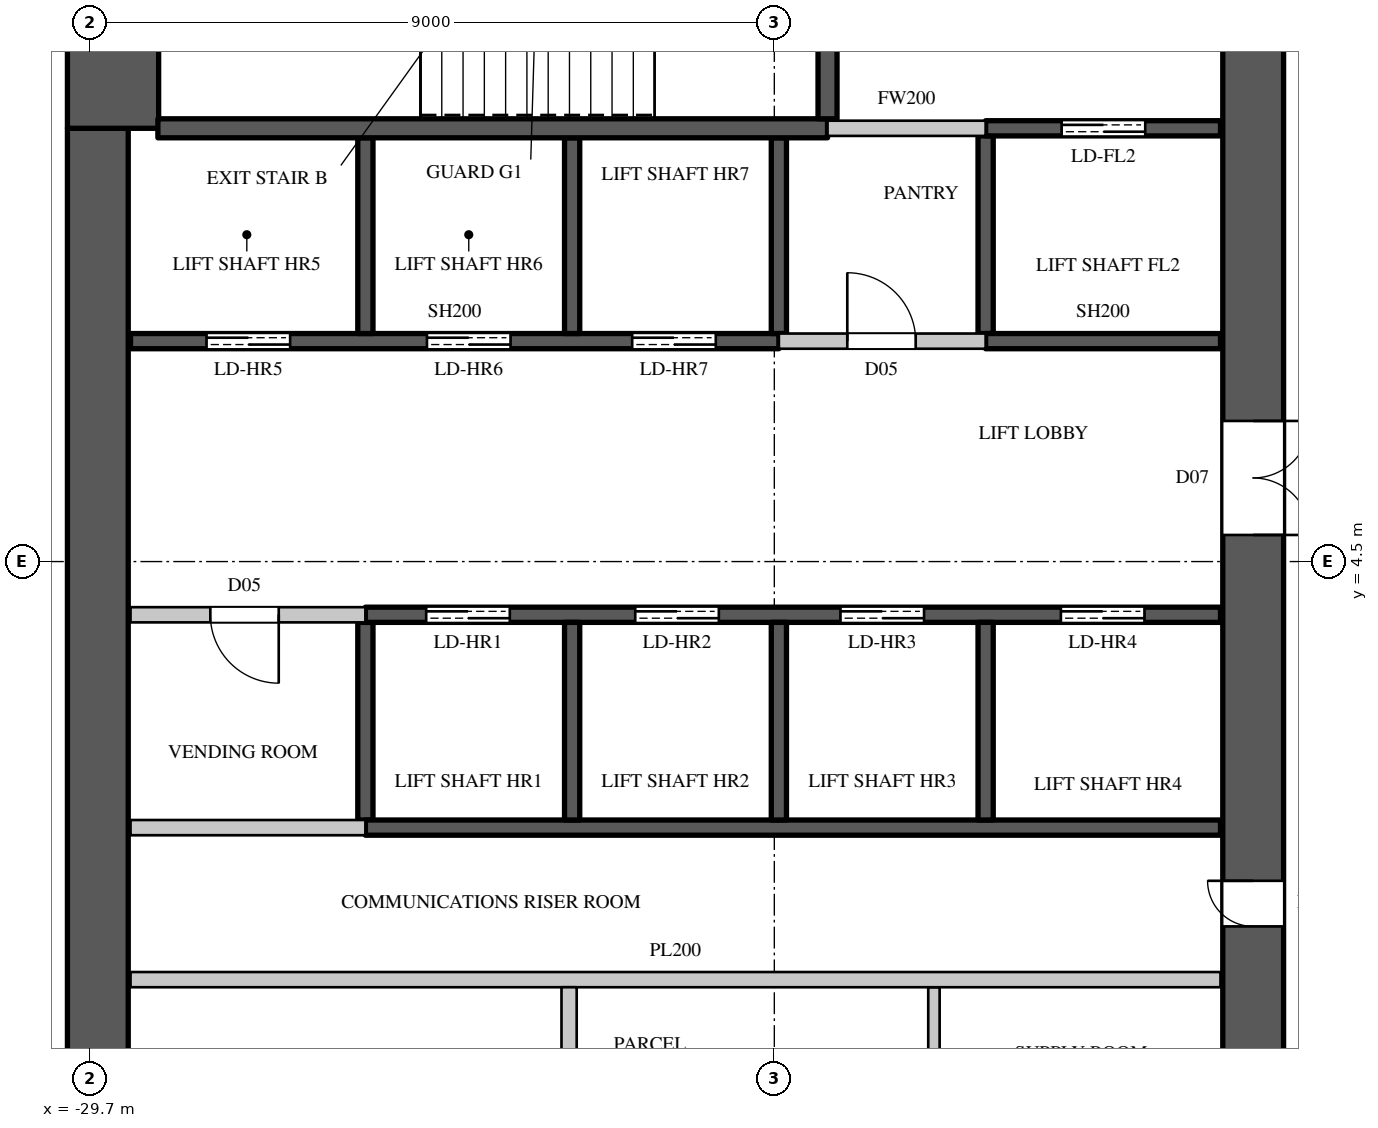
"""IFC4 building model, lengths in metres.
Left out: names, types, materials, properties, quantities, classifications, styles, units other than length and angle.
Written with IfcOpenShell. Run it as: python <this file> out.ifc"""

import sys

from ifc_helpers import new_model, si_unit, direction, frame, frame_2d, origin, place, context, subcontext, project, spatial, rectangle, extrude, element, fill, save


model = new_model("IFC4")
c1 = context("Model", 3, precision=1e-05, world=origin(), true_north=direction((0.0, 1.0)))
c2 = subcontext(c1, "Body", "Model", "MODEL_VIEW")
j1 = project(units=[si_unit("LENGTHUNIT", "METRE"), si_unit("PLANEANGLEUNIT", "RADIAN")], contexts=[c1])
p1 = place(None, origin())
s1 = spatial("IfcSite", under=j1, at=p1, CompositionType="ELEMENT")
p2 = place(p1, origin())
s2 = spatial("IfcBuilding", under=s1, at=p2, CompositionType="ELEMENT")
p3 = place(p2, frame((0.0, 0.0, 201.5)))
s3 = spatial("IfcBuildingStorey", under=s2, at=p3, CompositionType="ELEMENT", Elevation=201.5)
p4 = place(p3, frame((-14.4, -14.8, 0.0), z_axis=(0.0, 0.0, 1.0), x_axis=(0.0, 1.0, 0.0)))
e1 = element("IfcWall", 1, at=p4, inside=s3, PredefinedType="SHEAR", context=c2, shape_type="SweptSolid", body=[
    extrude(rectangle(XDim=29.6, YDim=0.8, at=frame_2d((14.8, 0.0))), origin(), (0.0, 0.0, 1.0), 4.1),
])
p5 = place(p4, frame((1.55, 0.0, 0.0)))
e2 = element("IfcOpeningElement", 2, at=p5, cuts=e1, PredefinedType="OPENING", context=c2, shape_type="SweptSolid", body=[
    extrude(rectangle(XDim=1.5, YDim=2.4, at=frame_2d((0.75, 1.2))), frame((0.0, 0.41, 0.0), z_axis=(0.0, -1.0, 0.0), x_axis=(1.0, 0.0, 0.0)), (0.0, 0.0, 1.0), 0.82),
])
p6 = place(p4, frame((26.55, 0.0, 0.0)))
e3 = element("IfcOpeningElement", 3, at=p6, cuts=e1, PredefinedType="OPENING", context=c2, shape_type="SweptSolid", body=[
    extrude(rectangle(XDim=1.5, YDim=2.4, at=frame_2d((0.75, 1.2))), frame((0.0, 0.41, 0.0), z_axis=(0.0, -1.0, 0.0), x_axis=(1.0, 0.0, 0.0)), (0.0, 0.0, 1.0), 0.82),
])
p7 = place(p4, frame((8.45, 0.0, 0.0)))
e4 = element("IfcOpeningElement", 4, at=p7, cuts=e1, PredefinedType="OPENING", context=c2, shape_type="SweptSolid", body=[
    extrude(rectangle(XDim=1.5, YDim=2.4, at=frame_2d((0.75, 1.2))), frame((0.0, 0.41, 0.0), z_axis=(0.0, -1.0, 0.0), x_axis=(1.0, 0.0, 0.0)), (0.0, 0.0, 1.0), 0.82),
])
p8 = place(p4, frame((19.65, 0.0, 0.0)))
e5 = element("IfcOpeningElement", 5, at=p8, cuts=e1, PredefinedType="OPENING", context=c2, shape_type="SweptSolid", body=[
    extrude(rectangle(XDim=1.5, YDim=2.4, at=frame_2d((0.75, 1.2))), frame((0.0, 0.41, 0.0), z_axis=(0.0, -1.0, 0.0), x_axis=(1.0, 0.0, 0.0)), (0.0, 0.0, 1.0), 0.82),
])
p9 = place(p4, frame((14.5, 0.0, 0.0)))
e6 = element("IfcOpeningElement", 6, at=p9, cuts=e1, PredefinedType="OPENING", context=c2, shape_type="SweptSolid", body=[
    extrude(rectangle(XDim=0.6, YDim=2.0, at=frame_2d((0.3, 1.0))), frame((0.0, 0.41, 0.0), z_axis=(0.0, -1.0, 0.0), x_axis=(1.0, 0.0, 0.0)), (0.0, 0.0, 1.0), 0.82),
])
p10 = place(p3, frame((-29.6, -10.2, 0.0), z_axis=(0.0, 0.0, 1.0), x_axis=(0.0, 1.0, 0.0)))
e7 = element("IfcWall", 7, at=p10, inside=s3, PredefinedType="SHEAR", context=c2, shape_type="SweptSolid", body=[
    extrude(rectangle(XDim=20.4, YDim=0.8, at=frame_2d((10.2, 0.0))), origin(), (0.0, 0.0, 1.0), 4.1),
])
p11 = place(p3, frame((-29.4, 10.2, 0.0), z_axis=(0.0, 0.0, 1.0), x_axis=(0.0, 1.0, 0.0)))
e8 = element("IfcWall", 8, at=p11, inside=s3, PredefinedType="SHEAR", context=c2, shape_type="SweptSolid", body=[
    extrude(rectangle(XDim=4.6, YDim=1.2, at=frame_2d((2.3, 0.0))), origin(), (0.0, 0.0, 1.0), 4.1),
])
p12 = place(p3, frame((-29.17, 3.8, 0.0), z_axis=(0.0, 0.0, 1.0), x_axis=(1.0, 0.0, 0.0)))
e9 = element("IfcWall", 9, at=p12, inside=s3, PredefinedType="PARTITIONING", context=c2, shape_type="SweptSolid", body=[
    extrude(rectangle(XDim=3.09, YDim=0.2, at=frame_2d((1.545, 0.0))), origin(), (0.0, 0.0, 1.0), 3.8),
])
p13 = place(p12, frame((1.05, 0.0, 0.0)))
e10 = element("IfcOpeningElement", 10, at=p13, cuts=e9, PredefinedType="OPENING", context=c2, shape_type="SweptSolid", body=[
    extrude(rectangle(XDim=0.9, YDim=2.2, at=frame_2d((0.45, 1.1))), frame((0.0, 0.11, 0.0), z_axis=(0.0, -1.0, 0.0), x_axis=(1.0, 0.0, 0.0)), (0.0, 0.0, 1.0), 0.22),
])
p14 = place(p3, frame((-20.64, 7.4, 0.0), z_axis=(0.0, 0.0, 1.0), x_axis=(1.0, 0.0, 0.0)))
e11 = element("IfcWall", 11, at=p14, inside=s3, PredefinedType="PARTITIONING", context=c2, shape_type="SweptSolid", body=[
    extrude(rectangle(XDim=2.72, YDim=0.2, at=frame_2d((1.36, 0.0))), origin(), (0.0, 0.0, 1.0), 3.8),
])
p15 = place(p14, frame((0.9, 0.0, 0.0)))
e12 = element("IfcOpeningElement", 12, at=p15, cuts=e11, PredefinedType="OPENING", context=c2, shape_type="SweptSolid", body=[
    extrude(rectangle(XDim=0.9, YDim=2.2, at=frame_2d((0.45, 1.1))), frame((0.0, 0.11, 0.0), z_axis=(0.0, -1.0, 0.0), x_axis=(1.0, 0.0, 0.0)), (0.0, 0.0, 1.0), 0.22),
])
p16 = place(p3, frame((-20.0, 10.2, 0.0), z_axis=(0.0, 0.0, 1.0), x_axis=(1.0, 0.0, 0.0)))
e13 = element("IfcWall", 13, at=p16, inside=s3, PredefinedType="PARTITIONING", context=c2, shape_type="SweptSolid", body=[
    extrude(rectangle(XDim=2.08, YDim=0.2, at=frame_2d((1.04, 0.0))), origin(), (0.0, 0.0, 1.0), 3.8),
])
p17 = place(p3, frame((-18.6, -3.7, 0.0), z_axis=(0.0, 0.0, 1.0), x_axis=(0.0, 1.0, 0.0)))
e14 = element("IfcWall", 14, at=p17, inside=s3, PredefinedType="PARTITIONING", context=c2, shape_type="SweptSolid", body=[
    extrude(rectangle(XDim=2.6, YDim=0.15, at=frame_2d((1.3, 0.0))), origin(), (0.0, 0.0, 1.0), 3.8),
])
p18 = place(p3, frame((-29.17, -1.0, 0.0), z_axis=(0.0, 0.0, 1.0), x_axis=(1.0, 0.0, 0.0)))
e15 = element("IfcWall", 15, at=p18, inside=s3, PredefinedType="PARTITIONING", context=c2, shape_type="SweptSolid", body=[
    extrude(rectangle(XDim=14.34, YDim=0.2, at=frame_2d((7.17, 0.0))), origin(), (0.0, 0.0, 1.0), 3.8),
])
p19 = place(p3, frame((-29.17, 1.0, 0.0), z_axis=(0.0, 0.0, 1.0), x_axis=(1.0, 0.0, 0.0)))
e16 = element("IfcWall", 16, at=p19, inside=s3, PredefinedType="PARTITIONING", context=c2, shape_type="SweptSolid", body=[
    extrude(rectangle(XDim=3.09, YDim=0.2, at=frame_2d((1.545, 0.0))), origin(), (0.0, 0.0, 1.0), 3.8),
])
p20 = place(p3, frame((-23.4, -3.7, 0.0), z_axis=(0.0, 0.0, 1.0), x_axis=(0.0, 1.0, 0.0)))
e17 = element("IfcWall", 17, at=p20, inside=s3, PredefinedType="PARTITIONING", context=c2, shape_type="SweptSolid", body=[
    extrude(rectangle(XDim=2.6, YDim=0.2, at=frame_2d((1.3, 0.0))), origin(), (0.0, 0.0, 1.0), 3.8),
])
p21 = place(p3, frame((-29.17, 7.4, 0.0), z_axis=(0.0, 0.0, 1.0), x_axis=(1.0, 0.0, 0.0)))
e18 = element("IfcWall", 18, at=p21, inside=s3, PredefinedType="SHEAR", context=c2, shape_type="SweptSolid", body=[
    extrude(rectangle(XDim=8.53, YDim=0.2, at=frame_2d((4.265, 0.0))), origin(), (0.0, 0.0, 1.0), 3.8),
])
p22 = place(p21, frame((1.0, 0.0, 0.0)))
e19 = element("IfcOpeningElement", 19, at=p22, cuts=e18, PredefinedType="OPENING", context=c2, shape_type="SweptSolid", body=[
    extrude(rectangle(XDim=1.1, YDim=2.2, at=frame_2d((0.55, 1.1))), frame((0.0, 0.11, 0.0), z_axis=(0.0, -1.0, 0.0), x_axis=(1.0, 0.0, 0.0)), (0.0, 0.0, 1.0), 0.22),
])
p23 = place(p21, frame((3.9, 0.0, 0.0)))
e20 = element("IfcOpeningElement", 20, at=p23, cuts=e18, PredefinedType="OPENING", context=c2, shape_type="SweptSolid", body=[
    extrude(rectangle(XDim=1.1, YDim=2.2, at=frame_2d((0.55, 1.1))), frame((0.0, 0.11, 0.0), z_axis=(0.0, -1.0, 0.0), x_axis=(1.0, 0.0, 0.0)), (0.0, 0.0, 1.0), 0.22),
])
p24 = place(p21, frame((6.6, 0.0, 0.0)))
e21 = element("IfcOpeningElement", 21, at=p24, cuts=e18, PredefinedType="OPENING", context=c2, shape_type="SweptSolid", body=[
    extrude(rectangle(XDim=1.1, YDim=2.2, at=frame_2d((0.55, 1.1))), frame((0.0, 0.11, 0.0), z_axis=(0.0, -1.0, 0.0), x_axis=(1.0, 0.0, 0.0)), (0.0, 0.0, 1.0), 0.22),
])
p25 = place(p3, frame((-26.08, 1.1, 0.0), z_axis=(0.0, 0.0, 1.0), x_axis=(0.0, 1.0, 0.0)))
e22 = element("IfcWall", 22, at=p25, inside=s3, PredefinedType="SHEAR", context=c2, shape_type="SweptSolid", body=[
    extrude(rectangle(XDim=2.6, YDim=0.2, at=frame_2d((1.3, 0.0))), origin(), (0.0, 0.0, 1.0), 3.8),
])
p26 = place(p3, frame((-26.08, 1.0, 0.0), z_axis=(0.0, 0.0, 1.0), x_axis=(1.0, 0.0, 0.0)))
e23 = element("IfcWall", 23, at=p26, inside=s3, PredefinedType="SHEAR", context=c2, shape_type="SweptSolid", body=[
    extrude(rectangle(XDim=11.25, YDim=0.2, at=frame_2d((5.625, 0.0))), origin(), (0.0, 0.0, 1.0), 3.8),
])
p27 = place(p3, frame((-26.08, 3.8, 0.0), z_axis=(0.0, 0.0, 1.0), x_axis=(1.0, 0.0, 0.0)))
e24 = element("IfcWall", 24, at=p27, inside=s3, PredefinedType="SHEAR", context=c2, shape_type="SweptSolid", body=[
    extrude(rectangle(XDim=11.25, YDim=0.2, at=frame_2d((5.625, 0.0))), origin(), (0.0, 0.0, 1.0), 3.8),
])
p28 = place(p27, frame((0.8, 0.0, 0.0)))
e25 = element("IfcOpeningElement", 25, at=p28, cuts=e24, PredefinedType="OPENING", context=c2, shape_type="SweptSolid", body=[
    extrude(rectangle(XDim=1.1, YDim=2.2, at=frame_2d((0.55, 1.1))), frame((0.0, 0.11, 0.0), z_axis=(0.0, -1.0, 0.0), x_axis=(1.0, 0.0, 0.0)), (0.0, 0.0, 1.0), 0.22),
])
p29 = place(p27, frame((3.55, 0.0, 0.0)))
e26 = element("IfcOpeningElement", 26, at=p29, cuts=e24, PredefinedType="OPENING", context=c2, shape_type="SweptSolid", body=[
    extrude(rectangle(XDim=1.1, YDim=2.2, at=frame_2d((0.55, 1.1))), frame((0.0, 0.11, 0.0), z_axis=(0.0, -1.0, 0.0), x_axis=(1.0, 0.0, 0.0)), (0.0, 0.0, 1.0), 0.22),
])
p30 = place(p27, frame((6.25, 0.0, 0.0)))
e27 = element("IfcOpeningElement", 27, at=p30, cuts=e24, PredefinedType="OPENING", context=c2, shape_type="SweptSolid", body=[
    extrude(rectangle(XDim=1.1, YDim=2.2, at=frame_2d((0.55, 1.1))), frame((0.0, 0.11, 0.0), z_axis=(0.0, -1.0, 0.0), x_axis=(1.0, 0.0, 0.0)), (0.0, 0.0, 1.0), 0.22),
])
p31 = place(p27, frame((9.15, 0.0, 0.0)))
e28 = element("IfcOpeningElement", 28, at=p31, cuts=e24, PredefinedType="OPENING", context=c2, shape_type="SweptSolid", body=[
    extrude(rectangle(XDim=1.1, YDim=2.2, at=frame_2d((0.55, 1.1))), frame((0.0, 0.11, 0.0), z_axis=(0.0, -1.0, 0.0), x_axis=(1.0, 0.0, 0.0)), (0.0, 0.0, 1.0), 0.22),
])
p32 = place(p3, frame((-26.08, 7.5, 0.0), z_axis=(0.0, 0.0, 1.0), x_axis=(0.0, 1.0, 0.0)))
e29 = element("IfcWall", 29, at=p32, inside=s3, PredefinedType="SHEAR", context=c2, shape_type="SweptSolid", body=[
    extrude(rectangle(XDim=2.575, YDim=0.2, at=frame_2d((1.288, 0.0))), origin(), (0.0, 0.0, 1.0), 4.1),
])
p33 = place(p3, frame((-23.36, 1.1, 0.0), z_axis=(0.0, 0.0, 1.0), x_axis=(0.0, 1.0, 0.0)))
e30 = element("IfcWall", 30, at=p33, inside=s3, PredefinedType="SHEAR", context=c2, shape_type="SweptSolid", body=[
    extrude(rectangle(XDim=2.6, YDim=0.2, at=frame_2d((1.3, 0.0))), origin(), (0.0, 0.0, 1.0), 4.1),
])
p34 = place(p3, frame((-23.36, 7.5, 0.0), z_axis=(0.0, 0.0, 1.0), x_axis=(0.0, 1.0, 0.0)))
e31 = element("IfcWall", 31, at=p34, inside=s3, PredefinedType="SHEAR", context=c2, shape_type="SweptSolid", body=[
    extrude(rectangle(XDim=2.575, YDim=0.2, at=frame_2d((1.288, 0.0))), origin(), (0.0, 0.0, 1.0), 4.1),
])
p35 = place(p3, frame((-20.64, 1.1, 0.0), z_axis=(0.0, 0.0, 1.0), x_axis=(0.0, 1.0, 0.0)))
e32 = element("IfcWall", 32, at=p35, inside=s3, PredefinedType="SHEAR", context=c2, shape_type="SweptSolid", body=[
    extrude(rectangle(XDim=2.6, YDim=0.2, at=frame_2d((1.3, 0.0))), origin(), (0.0, 0.0, 1.0), 4.1),
])
p36 = place(p3, frame((-20.64, 7.5, 0.0), z_axis=(0.0, 0.0, 1.0), x_axis=(0.0, 1.0, 0.0)))
e33 = element("IfcWall", 33, at=p36, inside=s3, PredefinedType="SHEAR", context=c2, shape_type="SweptSolid", body=[
    extrude(rectangle(XDim=2.575, YDim=0.2, at=frame_2d((1.288, 0.0))), origin(), (0.0, 0.0, 1.0), 3.8),
])
p37 = place(p3, frame((-17.92, 1.1, 0.0), z_axis=(0.0, 0.0, 1.0), x_axis=(0.0, 1.0, 0.0)))
e34 = element("IfcWall", 34, at=p37, inside=s3, PredefinedType="SHEAR", context=c2, shape_type="SweptSolid", body=[
    extrude(rectangle(XDim=2.6, YDim=0.2, at=frame_2d((1.3, 0.0))), origin(), (0.0, 0.0, 1.0), 4.1),
])
p38 = place(p3, frame((-17.92, 7.5, 0.0), z_axis=(0.0, 0.0, 1.0), x_axis=(0.0, 1.0, 0.0)))
e35 = element("IfcWall", 35, at=p38, inside=s3, PredefinedType="SHEAR", context=c2, shape_type="SweptSolid", body=[
    extrude(rectangle(XDim=2.6, YDim=0.2, at=frame_2d((1.3, 0.0))), origin(), (0.0, 0.0, 1.0), 3.8),
])
p39 = place(p3, frame((-17.92, 7.4, 0.0), z_axis=(0.0, 0.0, 1.0), x_axis=(1.0, 0.0, 0.0)))
e36 = element("IfcWall", 36, at=p39, inside=s3, PredefinedType="SHEAR", context=c2, shape_type="SweptSolid", body=[
    extrude(rectangle(XDim=3.09, YDim=0.2, at=frame_2d((1.545, 0.0))), origin(), (0.0, 0.0, 1.0), 3.8),
])
p40 = place(p3, frame((-17.92, 10.2, 0.0), z_axis=(0.0, 0.0, 1.0), x_axis=(1.0, 0.0, 0.0)))
e37 = element("IfcWall", 37, at=p40, inside=s3, PredefinedType="SHEAR", context=c2, shape_type="SweptSolid", body=[
    extrude(rectangle(XDim=3.09, YDim=0.2, at=frame_2d((1.545, 0.0))), origin(), (0.0, 0.0, 1.0), 3.8),
])
p41 = place(p40, frame((1.0, 0.0, 0.0)))
e38 = element("IfcOpeningElement", 38, at=p41, cuts=e37, PredefinedType="OPENING", context=c2, shape_type="SweptSolid", body=[
    extrude(rectangle(XDim=1.1, YDim=2.2, at=frame_2d((0.55, 1.1))), frame((0.0, 0.11, 0.0), z_axis=(0.0, -1.0, 0.0), x_axis=(1.0, 0.0, 0.0)), (0.0, 0.0, 1.0), 0.22),
])
p42 = place(p3, frame((-28.81, 10.2, 0.0), z_axis=(0.0, 0.0, 1.0), x_axis=(1.0, 0.0, 0.0)))
e39 = element("IfcWall", 39, at=p42, inside=s3, PredefinedType="SHEAR", context=c2, shape_type="SweptSolid", body=[
    extrude(rectangle(XDim=8.81, YDim=0.25, at=frame_2d((4.405, 0.0))), origin(), (0.0, 0.0, 1.0), 3.8),
])
p43 = place(p3, frame((-20.0, 10.325, 0.0), z_axis=(0.0, 0.0, 1.0), x_axis=(0.0, 1.0, 0.0)))
e40 = element("IfcWall", 40, at=p43, inside=s3, PredefinedType="SHEAR", context=c2, shape_type="SweptSolid", body=[
    extrude(rectangle(XDim=4.445, YDim=0.25, at=frame_2d((2.223, 0.0))), origin(), (0.0, 0.0, 1.0), 3.8),
])
p44 = place(p43, frame((1.65, 0.0, 0.0)))
e41 = element("IfcOpeningElement", 41, at=p44, cuts=e40, PredefinedType="OPENING", context=c2, shape_type="SweptSolid", body=[
    extrude(rectangle(XDim=1.1, YDim=2.2, at=frame_2d((0.55, 1.1))), frame((0.0, 0.135, 0.0), z_axis=(0.0, -1.0, 0.0), x_axis=(1.0, 0.0, 0.0)), (0.0, 0.0, 1.0), 0.27),
])
p45 = place(p13, origin())
e42 = element("IfcDoor", 42, at=p45, inside=s3, OperationType="SINGLE_SWING_LEFT", PredefinedType="DOOR", context=c2, shape_type="SweptSolid", body=[
    extrude(rectangle(XDim=0.9, YDim=2.2, at=frame_2d((0.45, 1.1))), frame((0.0, 0.025, 0.0), z_axis=(0.0, -1.0, 0.0), x_axis=(1.0, 0.0, 0.0)), (0.0, 0.0, 1.0), 0.05),
])
fill(e10, e42)
p46 = place(p15, origin())
e43 = element("IfcDoor", 43, at=p46, inside=s3, OperationType="SINGLE_SWING_LEFT", PredefinedType="DOOR", context=c2, shape_type="SweptSolid", body=[
    extrude(rectangle(XDim=0.9, YDim=2.2, at=frame_2d((0.45, 1.1))), frame((0.0, 0.025, 0.0), z_axis=(0.0, -1.0, 0.0), x_axis=(1.0, 0.0, 0.0)), (0.0, 0.0, 1.0), 0.05),
])
fill(e12, e43)
p47 = place(p28, origin())
e44 = element("IfcDoor", 44, at=p47, inside=s3, OperationType="DOUBLE_DOOR_SLIDING", PredefinedType="DOOR", context=c2, shape_type="SweptSolid", body=[
    extrude(rectangle(XDim=1.1, YDim=2.2, at=frame_2d((0.55, 1.1))), frame((0.0, 0.025, 0.0), z_axis=(0.0, -1.0, 0.0), x_axis=(1.0, 0.0, 0.0)), (0.0, 0.0, 1.0), 0.05),
])
fill(e25, e44)
p48 = place(p29, origin())
e45 = element("IfcDoor", 45, at=p48, inside=s3, OperationType="DOUBLE_DOOR_SLIDING", PredefinedType="DOOR", context=c2, shape_type="SweptSolid", body=[
    extrude(rectangle(XDim=1.1, YDim=2.2, at=frame_2d((0.55, 1.1))), frame((0.0, 0.025, 0.0), z_axis=(0.0, -1.0, 0.0), x_axis=(1.0, 0.0, 0.0)), (0.0, 0.0, 1.0), 0.05),
])
fill(e26, e45)
p49 = place(p30, origin())
e46 = element("IfcDoor", 46, at=p49, inside=s3, OperationType="DOUBLE_DOOR_SLIDING", PredefinedType="DOOR", context=c2, shape_type="SweptSolid", body=[
    extrude(rectangle(XDim=1.1, YDim=2.2, at=frame_2d((0.55, 1.1))), frame((0.0, 0.025, 0.0), z_axis=(0.0, -1.0, 0.0), x_axis=(1.0, 0.0, 0.0)), (0.0, 0.0, 1.0), 0.05),
])
fill(e27, e46)
p50 = place(p31, origin())
e47 = element("IfcDoor", 47, at=p50, inside=s3, OperationType="DOUBLE_DOOR_SLIDING", PredefinedType="DOOR", context=c2, shape_type="SweptSolid", body=[
    extrude(rectangle(XDim=1.1, YDim=2.2, at=frame_2d((0.55, 1.1))), frame((0.0, 0.025, 0.0), z_axis=(0.0, -1.0, 0.0), x_axis=(1.0, 0.0, 0.0)), (0.0, 0.0, 1.0), 0.05),
])
fill(e28, e47)
p51 = place(p22, origin())
e48 = element("IfcDoor", 48, at=p51, inside=s3, OperationType="DOUBLE_DOOR_SLIDING", PredefinedType="DOOR", context=c2, shape_type="SweptSolid", body=[
    extrude(rectangle(XDim=1.1, YDim=2.2, at=frame_2d((0.55, 1.1))), frame((0.0, 0.025, 0.0), z_axis=(0.0, -1.0, 0.0), x_axis=(1.0, 0.0, 0.0)), (0.0, 0.0, 1.0), 0.05),
])
fill(e19, e48)
p52 = place(p23, origin())
e49 = element("IfcDoor", 49, at=p52, inside=s3, OperationType="DOUBLE_DOOR_SLIDING", PredefinedType="DOOR", context=c2, shape_type="SweptSolid", body=[
    extrude(rectangle(XDim=1.1, YDim=2.2, at=frame_2d((0.55, 1.1))), frame((0.0, 0.025, 0.0), z_axis=(0.0, -1.0, 0.0), x_axis=(1.0, 0.0, 0.0)), (0.0, 0.0, 1.0), 0.05),
])
fill(e20, e49)
p53 = place(p24, origin())
e50 = element("IfcDoor", 50, at=p53, inside=s3, OperationType="DOUBLE_DOOR_SLIDING", PredefinedType="DOOR", context=c2, shape_type="SweptSolid", body=[
    extrude(rectangle(XDim=1.1, YDim=2.2, at=frame_2d((0.55, 1.1))), frame((0.0, 0.025, 0.0), z_axis=(0.0, -1.0, 0.0), x_axis=(1.0, 0.0, 0.0)), (0.0, 0.0, 1.0), 0.05),
])
fill(e21, e50)
p54 = place(p41, origin())
e51 = element("IfcDoor", 51, at=p54, inside=s3, OperationType="DOUBLE_DOOR_SLIDING", PredefinedType="DOOR", context=c2, shape_type="SweptSolid", body=[
    extrude(rectangle(XDim=1.1, YDim=2.2, at=frame_2d((0.55, 1.1))), frame((0.0, 0.025, 0.0), z_axis=(0.0, -1.0, 0.0), x_axis=(1.0, 0.0, 0.0)), (0.0, 0.0, 1.0), 0.05),
])
fill(e38, e51)
p55 = place(p8, origin())
e52 = element("IfcDoor", 52, at=p55, inside=s3, OperationType="DOUBLE_DOOR_SINGLE_SWING", PredefinedType="DOOR", context=c2, shape_type="SweptSolid", body=[
    extrude(rectangle(XDim=1.5, YDim=2.4, at=frame_2d((0.75, 1.2))), frame((0.0, -0.345, 0.0), z_axis=(0.0, -1.0, 0.0), x_axis=(1.0, 0.0, 0.0)), (0.0, 0.0, 1.0), 0.05),
])
fill(e5, e52)
p56 = place(p9, origin())
e53 = element("IfcDoor", 53, at=p56, inside=s3, OperationType="SINGLE_SWING_RIGHT", PredefinedType="DOOR", context=c2, shape_type="SweptSolid", body=[
    extrude(rectangle(XDim=0.6, YDim=2.0, at=frame_2d((0.3, 1.0))), frame((0.0, 0.395, 0.0), z_axis=(0.0, -1.0, 0.0), x_axis=(1.0, 0.0, 0.0)), (0.0, 0.0, 1.0), 0.05),
])
fill(e6, e53)
save(model, sys.argv[1])
